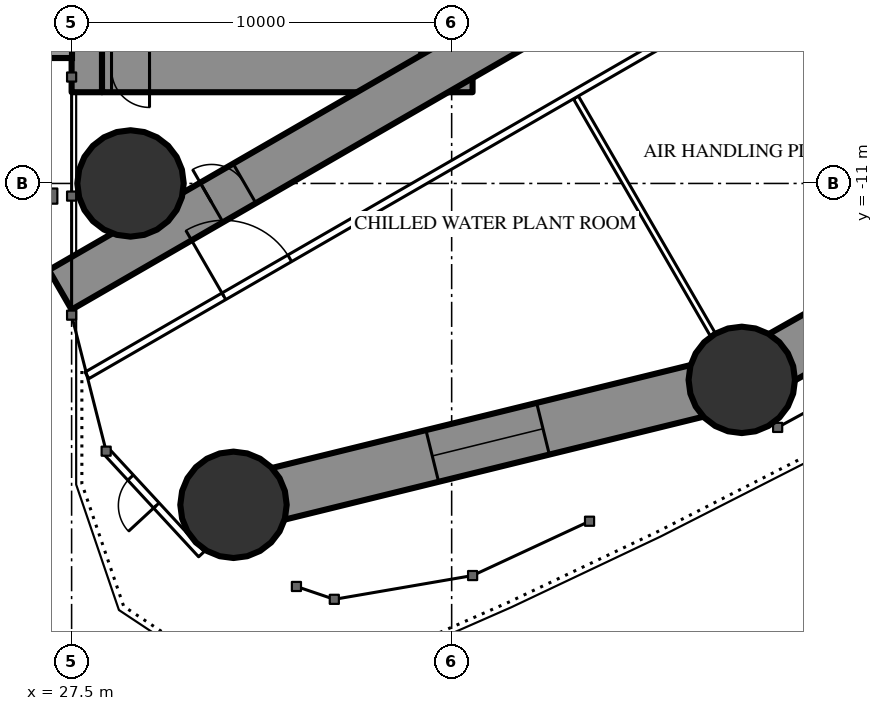
"""IFC4 building model, lengths in metres.
Left out: names, types, materials, properties, quantities, classifications, styles, units other than length and angle.
Written with IfcOpenShell. Run it as: python <this file> out.ifc"""

import sys

from ifc_helpers import new_model, si_unit, direction, frame, frame_2d, origin, origin_2d, place, context, subcontext, project, spatial, rectangle, circle, extrude, element, fill, save


model = new_model("IFC4")
c1 = context("Model", 3, precision=1e-05, world=origin(), true_north=direction((0.0, 1.0)))
c2 = subcontext(c1, "Body", "Model", "MODEL_VIEW")
j1 = project(units=[si_unit("LENGTHUNIT", "METRE"), si_unit("PLANEANGLEUNIT", "RADIAN")], contexts=[c1])
p1 = place(None, origin())
s1 = spatial("IfcSite", under=j1, at=p1, CompositionType="ELEMENT")
p2 = place(p1, origin())
s2 = spatial("IfcBuilding", under=s1, at=p2, CompositionType="ELEMENT")
p3 = place(p2, frame((0.0, 0.0, 152.7)))
s3 = spatial("IfcBuildingStorey", under=s2, at=p3, CompositionType="ELEMENT", Elevation=152.7)
for number, where, z_axis, x_axis in (
    (1, (31.76, -19.456, 0.0), (0.0, 0.0, 1.0), (1.0, 0.0, 0.0)),
    (2, (29.05, -11.0, 0.0), (0.0, 0.0, 1.0), (1.0, 0.0, 0.0)),
    (3, (45.134, -16.168, 0.0), (0.0, 0.0, 1.0), (1.0, 0.0, 0.0)),
):
    element("IfcColumn", number, at=place(p3, frame(where, z_axis=z_axis, x_axis=x_axis)), inside=s3, PredefinedType="COLUMN", context=c2, shape_type="SweptSolid", body=[
        extrude(circle(Radius=1.4, at=origin_2d()), origin(), (0.0, 0.0, 1.0), 3.6),
    ])
p4 = place(p3, frame((27.9, -8.6, 0.0), z_axis=(0.0, 0.0, 1.0), x_axis=(0.0, 1.0, 0.0)))
e4 = element("IfcWall", 4, at=p4, inside=s3, PredefinedType="SHEAR", context=c2, shape_type="SweptSolid", body=[
    extrude(rectangle(XDim=17.2, YDim=0.8, at=frame_2d((8.6, 0.0))), origin(), (0.0, 0.0, 1.0), 3.6),
])
p5 = place(p4, frame((2.45, 0.0, 0.6)))
e5 = element("IfcOpeningElement", 5, at=p5, cuts=e4, PredefinedType="OPENING", context=c2, shape_type="SweptSolid", body=[
    extrude(rectangle(XDim=0.6, YDim=2.1, at=frame_2d((0.3, 1.05))), frame((0.0, 0.41, 0.0), z_axis=(0.0, -1.0, 0.0), x_axis=(1.0, 0.0, 0.0)), (0.0, 0.0, 1.0), 0.82),
])
p6 = place(p4, frame((14.15, 0.0, 0.6)))
e6 = element("IfcOpeningElement", 6, at=p6, cuts=e4, PredefinedType="OPENING", context=c2, shape_type="SweptSolid", body=[
    extrude(rectangle(XDim=0.6, YDim=2.1, at=frame_2d((0.3, 1.05))), frame((0.0, 0.41, 0.0), z_axis=(0.0, -1.0, 0.0), x_axis=(1.0, 0.0, 0.0)), (0.0, 0.0, 1.0), 0.82),
])
p7 = place(p3, frame((37.375, -8.6, 0.0), z_axis=(0.0, 0.0, 1.0), x_axis=(0.0, 1.0, 0.0)))
e7 = element("IfcWall", 7, at=p7, inside=s3, PredefinedType="SHEAR", context=c2, shape_type="SweptSolid", body=[
    extrude(rectangle(XDim=17.2, YDim=1.35, at=frame_2d((8.6, 0.0))), origin(), (0.0, 0.0, 1.0), 3.6),
])
p8 = place(p7, frame((7.7, 0.0, 0.0)))
e8 = element("IfcOpeningElement", 8, at=p8, cuts=e7, PredefinedType="OPENING", context=c2, shape_type="SweptSolid", body=[
    extrude(rectangle(XDim=1.8, YDim=2.2, at=frame_2d((0.9, 1.1))), frame((0.0, 0.685, 0.0), z_axis=(0.0, -1.0, 0.0), x_axis=(1.0, 0.0, 0.0)), (0.0, 0.0, 1.0), 1.37),
])
p9 = place(p3, frame((28.3, -8.0, 0.0), z_axis=(0.0, 0.0, 1.0), x_axis=(1.0, 0.0, 0.0)))
e9 = element("IfcWall", 9, at=p9, inside=s3, PredefinedType="SHEAR", context=c2, shape_type="SweptSolid", body=[
    extrude(rectangle(XDim=8.4, YDim=1.2, at=frame_2d((4.2, 0.0))), origin(), (0.0, 0.0, 1.0), 3.6),
])
p10 = place(p9, frame((0.25, 0.0, 0.0)))
e10 = element("IfcOpeningElement", 10, at=p10, cuts=e9, PredefinedType="OPENING", context=c2, shape_type="SweptSolid", body=[
    extrude(rectangle(XDim=1.0, YDim=2.2, at=frame_2d((0.5, 1.1))), frame((0.0, 0.61, 0.0), z_axis=(0.0, -1.0, 0.0), x_axis=(1.0, 0.0, 0.0)), (0.0, 0.0, 1.0), 1.22),
])
p11 = place(p3, frame((27.2, -13.8, 0.0), z_axis=(0.0, 0.0, 1.0), x_axis=(0.866027159892, 0.499996958321, 0.0)))
e11 = element("IfcWall", 11, at=p11, inside=s3, PredefinedType="SHEAR", context=c2, shape_type="SweptSolid", body=[
    extrude(rectangle(XDim=27.947, YDim=1.2, at=frame_2d((13.973, 0.0))), origin(), (0.0, 0.0, 1.0), 3.6),
])
p12 = place(p11, frame((4.6, 0.0, 0.0)))
e12 = element("IfcOpeningElement", 12, at=p12, cuts=e11, PredefinedType="OPENING", context=c2, shape_type="SweptSolid", body=[
    extrude(rectangle(XDim=1.0, YDim=2.2, at=frame_2d((0.5, 1.1))), frame((0.0, 0.61, 0.0), z_axis=(0.0, -1.0, 0.0), x_axis=(1.0, 0.0, 0.0)), (0.0, 0.0, 1.0), 1.22),
])
p13 = place(p11, frame((13.568, 0.0, 0.0)))
e13 = element("IfcOpeningElement", 13, at=p13, cuts=e11, PredefinedType="OPENING", context=c2, shape_type="SweptSolid", body=[
    extrude(rectangle(XDim=1.8, YDim=2.04, at=frame_2d((0.9, 1.02))), frame((0.0, 0.61, 0.0), z_axis=(0.0, -1.0, 0.0), x_axis=(1.0, 0.0, 0.0)), (0.0, 0.0, 1.0), 1.22),
])
p14 = place(p3, frame((47.345, -2.862, 0.0), z_axis=(0.0, 0.0, 1.0), x_axis=(0.500012973899, -0.866017913171, 0.0)))
e14 = element("IfcWall", 14, at=p14, inside=s3, PredefinedType="SHEAR", context=c2, shape_type="SweptSolid", body=[
    extrude(rectangle(XDim=10.499, YDim=1.6, at=frame_2d((5.25, 0.0))), origin(), (0.0, 0.0, 1.0), 3.6),
])
p15 = place(p14, frame((5.087, 0.0, 0.0)))
e15 = element("IfcOpeningElement", 15, at=p15, cuts=e14, PredefinedType="OPENING", context=c2, shape_type="SweptSolid", body=[
    extrude(rectangle(XDim=1.0, YDim=2.2, at=frame_2d((0.5, 1.1))), frame((0.0, 0.81, 0.0), z_axis=(0.0, -1.0, 0.0), x_axis=(1.0, 0.0, 0.0)), (0.0, 0.0, 1.0), 1.62),
])
p16 = place(p3, frame((31.76, -19.456, 0.0), z_axis=(0.0, 0.0, 1.0), x_axis=(0.971093253227, 0.238700426344, 0.0)))
e16 = element("IfcWall", 16, at=p16, inside=s3, PredefinedType="SHEAR", context=c2, shape_type="SweptSolid", body=[
    extrude(rectangle(XDim=13.772, YDim=1.4, at=frame_2d((6.886, 0.0))), origin(), (0.0, 0.0, 1.0), 3.6),
])
p17 = place(p16, frame((5.386, 0.0, 0.6)))
e17 = element("IfcOpeningElement", 17, at=p17, cuts=e16, PredefinedType="OPENING", context=c2, shape_type="SweptSolid", body=[
    extrude(rectangle(XDim=3.0, YDim=1.2, at=frame_2d((1.5, 0.6))), frame((0.0, 0.71, 0.0), z_axis=(0.0, -1.0, 0.0), x_axis=(1.0, 0.0, 0.0)), (0.0, 0.0, 1.0), 1.42),
])
p18 = place(p3, frame((45.134, -16.168, 0.0), z_axis=(0.0, 0.0, 1.0), x_axis=(0.870721990329, 0.491775574381, 0.0)))
e18 = element("IfcWall", 18, at=p18, inside=s3, PredefinedType="SHEAR", context=c2, shape_type="SweptSolid", body=[
    extrude(rectangle(XDim=8.569, YDim=1.4, at=frame_2d((4.284, 0.0))), origin(), (0.0, 0.0, 1.0), 3.6),
])
p19 = place(p18, frame((2.784, 0.0, 0.6)))
e19 = element("IfcOpeningElement", 19, at=p19, cuts=e18, PredefinedType="OPENING", context=c2, shape_type="SweptSolid", body=[
    extrude(rectangle(XDim=3.0, YDim=1.2, at=frame_2d((1.5, 0.6))), frame((0.0, 0.71, 0.0), z_axis=(0.0, -1.0, 0.0), x_axis=(1.0, 0.0, 0.0)), (0.0, 0.0, 1.0), 1.42),
])
p20 = place(p3, frame((30.916, -20.756, 0.0), z_axis=(0.0, 0.0, 1.0), x_axis=(-0.678826386316, 0.734298806509, 0.0)))
e20 = element("IfcWall", 20, at=p20, inside=s3, PredefinedType="STANDARD", context=c2, shape_type="SweptSolid", body=[
    extrude(rectangle(XDim=3.693, YDim=0.2, at=frame_2d((1.846, 0.0))), origin(), (0.0, 0.0, 1.0), 3.35),
])
p21 = place(p20, frame((1.746, 0.0, 0.0)))
e21 = element("IfcOpeningElement", 21, at=p21, cuts=e20, PredefinedType="OPENING", context=c2, shape_type="SweptSolid", body=[
    extrude(rectangle(XDim=1.0, YDim=2.2, at=frame_2d((0.5, 1.1))), frame((0.0, 0.11, 0.0), z_axis=(0.0, -1.0, 0.0), x_axis=(1.0, 0.0, 0.0)), (0.0, 0.0, 1.0), 0.22),
])
p22 = place(p3, frame((40.769, -8.737, 0.0), z_axis=(0.0, 0.0, 1.0), x_axis=(0.500013115284, -0.866017831539, 0.0)))
e22 = element("IfcWall", 22, at=p22, inside=s3, PredefinedType="PARTITIONING", context=c2, shape_type="SweptSolid", body=[
    extrude(rectangle(XDim=7.198, YDim=0.15, at=frame_2d((3.599, 0.0))), origin(), (0.0, 0.0, 1.0), 2.4),
])
p23 = place(p3, frame((27.903, -16.05, 0.0), z_axis=(0.0, 0.0, 1.0), x_axis=(0.86602417537, 0.500002127671, 0.0)))
e23 = element("IfcWall", 23, at=p23, inside=s3, PredefinedType="PARTITIONING", context=c2, shape_type="SweptSolid", body=[
    extrude(rectangle(XDim=24.307, YDim=0.2, at=frame_2d((12.153, 0.0))), origin(), (0.0, 0.0, 1.0), 3.35),
])
p24 = place(p23, frame((4.162, 0.0, 0.0)))
e24 = element("IfcOpeningElement", 24, at=p24, cuts=e23, PredefinedType="OPENING", context=c2, shape_type="SweptSolid", body=[
    extrude(rectangle(XDim=2.0, YDim=2.4, at=frame_2d((1.0, 1.2))), frame((0.0, 0.11, 0.0), z_axis=(0.0, -1.0, 0.0), x_axis=(1.0, 0.0, 0.0)), (0.0, 0.0, 1.0), 0.22),
])
p25 = place(p23, frame((17.678, 0.0, 0.0)))
e25 = element("IfcOpeningElement", 25, at=p25, cuts=e23, PredefinedType="OPENING", context=c2, shape_type="SweptSolid", body=[
    extrude(rectangle(XDim=2.0, YDim=2.4, at=frame_2d((1.0, 1.2))), frame((0.0, 0.11, 0.0), z_axis=(0.0, -1.0, 0.0), x_axis=(1.0, 0.0, 0.0)), (0.0, 0.0, 1.0), 0.22),
])
p26 = place(p17, origin())
e26 = element("IfcWindow", 26, at=p26, inside=s3, PartitioningType="SINGLE_PANEL", PredefinedType="WINDOW", context=c2, shape_type="SweptSolid", body=[
    extrude(rectangle(XDim=3.0, YDim=1.2, at=frame_2d((1.5, 0.6))), frame((0.0, 0.03, 0.0), z_axis=(0.0, -1.0, 0.0), x_axis=(1.0, 0.0, 0.0)), (0.0, 0.0, 1.0), 0.06),
])
fill(e17, e26)
p27 = place(p21, origin())
e27 = element("IfcDoor", 27, at=p27, inside=s3, OperationType="SINGLE_SWING_LEFT", PredefinedType="DOOR", context=c2, shape_type="SweptSolid", body=[
    extrude(rectangle(XDim=1.0, YDim=2.2, at=frame_2d((0.5, 1.1))), frame((0.0, 0.025, 0.0), z_axis=(0.0, -1.0, 0.0), x_axis=(1.0, 0.0, 0.0)), (0.0, 0.0, 1.0), 0.05),
])
fill(e21, e27)
p28 = place(p24, origin())
e28 = element("IfcDoor", 28, at=p28, inside=s3, OperationType="DOUBLE_DOOR_SINGLE_SWING", PredefinedType="DOOR", context=c2, shape_type="SweptSolid", body=[
    extrude(rectangle(XDim=2.0, YDim=2.4, at=frame_2d((1.0, 1.2))), frame((0.0, 0.025, 0.0), z_axis=(0.0, -1.0, 0.0), x_axis=(1.0, 0.0, 0.0)), (0.0, 0.0, 1.0), 0.05),
])
fill(e24, e28)
p29 = place(p12, origin())
e29 = element("IfcDoor", 29, at=p29, inside=s3, OperationType="SINGLE_SWING_LEFT", PredefinedType="DOOR", context=c2, shape_type="SweptSolid", body=[
    extrude(rectangle(XDim=1.0, YDim=2.2, at=frame_2d((0.5, 1.1))), frame((0.0, 0.025, 0.0), z_axis=(0.0, -1.0, 0.0), x_axis=(1.0, 0.0, 0.0)), (0.0, 0.0, 1.0), 0.05),
])
fill(e12, e29)
p30 = place(p10, origin())
e30 = element("IfcDoor", 30, at=p30, inside=s3, OperationType="SINGLE_SWING_RIGHT", PredefinedType="DOOR", context=c2, shape_type="SweptSolid", body=[
    extrude(rectangle(XDim=1.0, YDim=2.2, at=frame_2d((0.5, 1.1))), frame((0.0, 0.025, 0.0), z_axis=(0.0, -1.0, 0.0), x_axis=(1.0, 0.0, 0.0)), (0.0, 0.0, 1.0), 0.05),
])
fill(e10, e30)
save(model, sys.argv[1])
